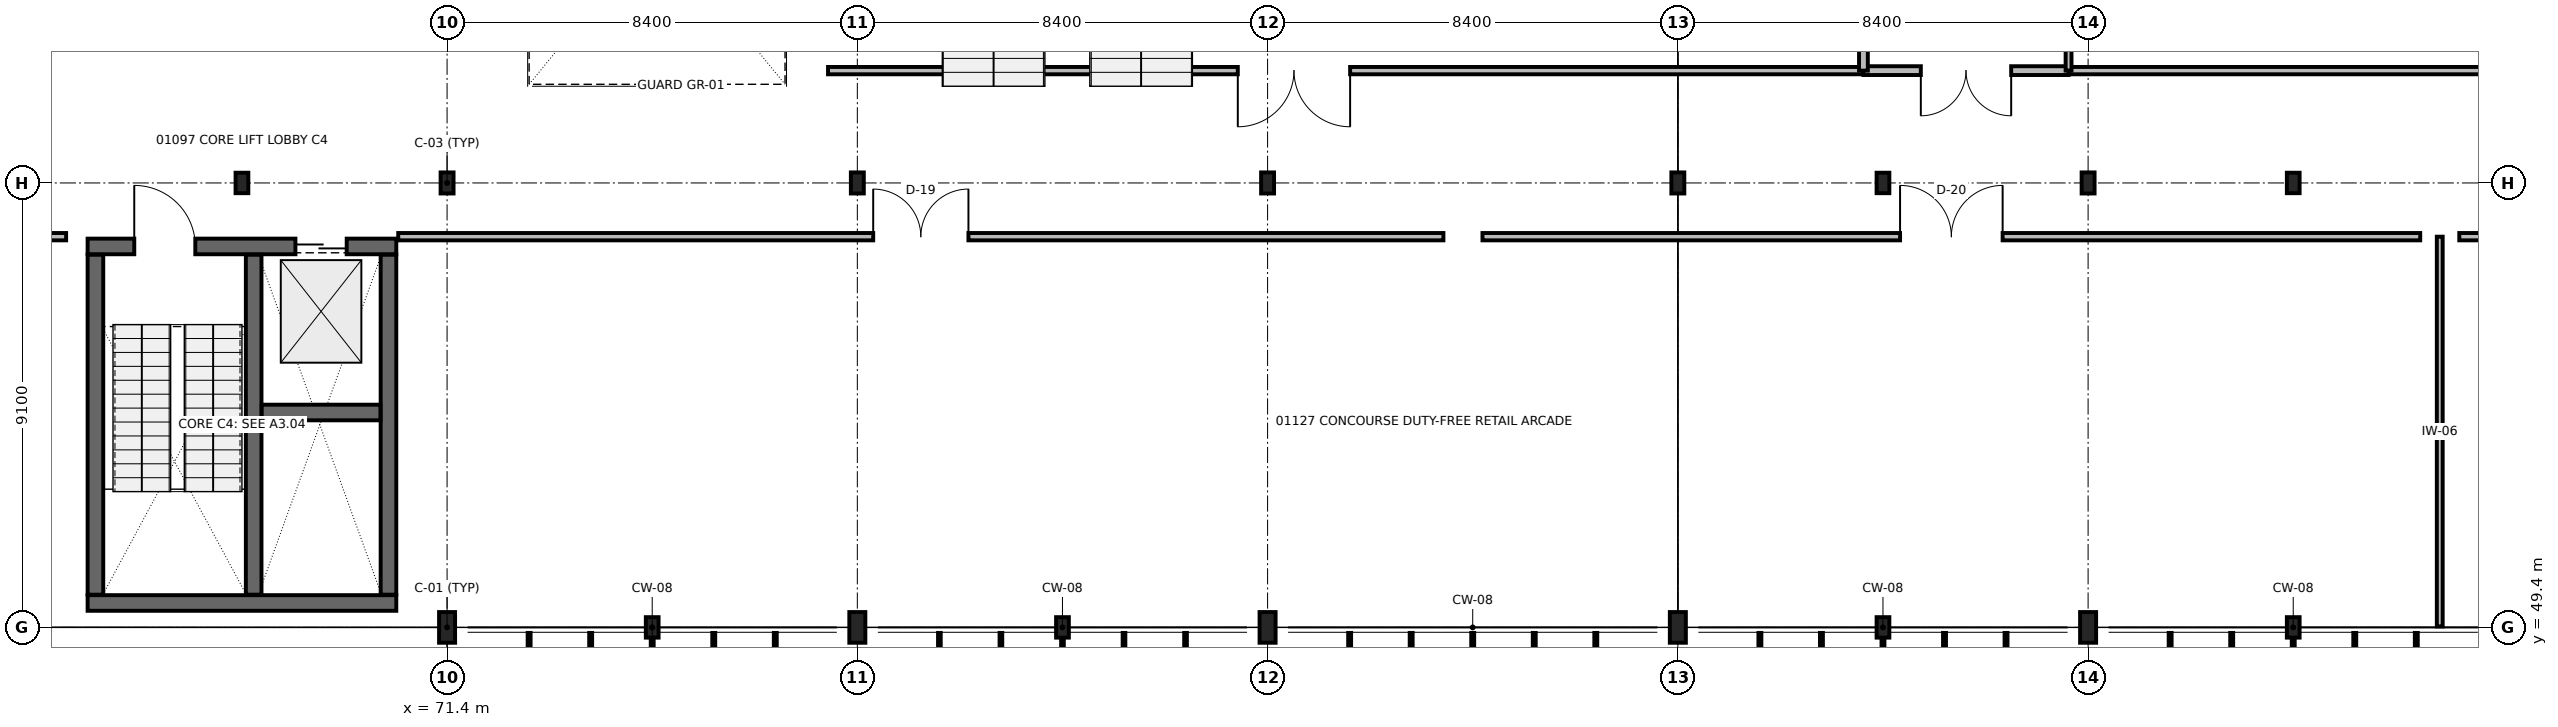
"""IFC4 building model, lengths in metres.
Left out: names, types, materials, properties, quantities, classifications, styles, units other than length and angle.
Written with IfcOpenShell. Run it as: python <this file> out.ifc"""

import sys

from ifc_helpers import new_model, si_unit, direction, frame, frame_2d, origin, origin_2d, place, context, subcontext, project, spatial, rectangle, i_section, extrude, element, fill, save


model = new_model("IFC4")
c1 = context("Model", 3, precision=1e-05, world=origin(), true_north=direction((0.0, 1.0)))
c2 = subcontext(c1, "Body", "Model", "MODEL_VIEW")
j1 = project(units=[si_unit("LENGTHUNIT", "METRE"), si_unit("PLANEANGLEUNIT", "RADIAN")], contexts=[c1])
p1 = place(None, origin())
s1 = spatial("IfcSite", under=j1, at=p1, CompositionType="ELEMENT")
p2 = place(p1, origin())
s2 = spatial("IfcBuilding", under=s1, at=p2, CompositionType="ELEMENT")
p3 = place(p2, frame((0.0, 0.0, 5.1)))
s3 = spatial("IfcBuildingStorey", under=s2, at=p3, CompositionType="ELEMENT", Elevation=5.1)
p4 = place(p3, frame((71.4, 49.4, 0.0), z_axis=(0.0, 0.0, 1.0), x_axis=(1.0, 0.0, 0.0)))
e1 = element("IfcColumn", 1, at=p4, inside=s3, PredefinedType="COLUMN", context=c2, shape_type="SweptSolid", body=[
    extrude(i_section(OverallWidth=0.328, OverallDepth=0.628, WebThickness=0.017, FlangeThickness=0.028, at=origin_2d()), origin(), (0.0, 0.0, 1.0), 4.5),
])
p5 = place(p3, frame((71.4, 58.5, 0.0), z_axis=(0.0, 0.0, 1.0), x_axis=(1.0, 0.0, 0.0)))
e2 = element("IfcColumn", 2, at=p5, inside=s3, PredefinedType="COLUMN", context=c2, shape_type="SweptSolid", body=[
    extrude(i_section(OverallWidth=0.265, OverallDepth=0.431, WebThickness=0.015, FlangeThickness=0.025, at=origin_2d()), origin(), (0.0, 0.0, 1.0), 4.5),
])
p6 = place(p3, frame((79.8, 49.4, 0.0), z_axis=(0.0, 0.0, 1.0), x_axis=(1.0, 0.0, 0.0)))
e3 = element("IfcColumn", 3, at=p6, inside=s3, PredefinedType="COLUMN", context=c2, shape_type="SweptSolid", body=[
    extrude(i_section(OverallWidth=0.328, OverallDepth=0.628, WebThickness=0.017, FlangeThickness=0.028, at=origin_2d()), origin(), (0.0, 0.0, 1.0), 4.5),
])
p7 = place(p3, frame((79.8, 58.5, 0.0), z_axis=(0.0, 0.0, 1.0), x_axis=(1.0, 0.0, 0.0)))
e4 = element("IfcColumn", 4, at=p7, inside=s3, PredefinedType="COLUMN", context=c2, shape_type="SweptSolid", body=[
    extrude(i_section(OverallWidth=0.265, OverallDepth=0.431, WebThickness=0.015, FlangeThickness=0.025, at=origin_2d()), origin(), (0.0, 0.0, 1.0), 4.5),
])
p8 = place(p3, frame((88.2, 49.4, 0.0), z_axis=(0.0, 0.0, 1.0), x_axis=(1.0, 0.0, 0.0)))
e5 = element("IfcColumn", 5, at=p8, inside=s3, PredefinedType="COLUMN", context=c2, shape_type="SweptSolid", body=[
    extrude(i_section(OverallWidth=0.328, OverallDepth=0.628, WebThickness=0.017, FlangeThickness=0.028, at=origin_2d()), origin(), (0.0, 0.0, 1.0), 4.5),
])
p9 = place(p3, frame((88.2, 58.5, 0.0), z_axis=(0.0, 0.0, 1.0), x_axis=(1.0, 0.0, 0.0)))
e6 = element("IfcColumn", 6, at=p9, inside=s3, PredefinedType="COLUMN", context=c2, shape_type="SweptSolid", body=[
    extrude(i_section(OverallWidth=0.265, OverallDepth=0.431, WebThickness=0.015, FlangeThickness=0.025, at=origin_2d()), origin(), (0.0, 0.0, 1.0), 4.5),
])
p10 = place(p3, frame((96.6, 49.4, 0.0), z_axis=(0.0, 0.0, 1.0), x_axis=(1.0, 0.0, 0.0)))
e7 = element("IfcColumn", 7, at=p10, inside=s3, PredefinedType="COLUMN", context=c2, shape_type="SweptSolid", body=[
    extrude(i_section(OverallWidth=0.328, OverallDepth=0.628, WebThickness=0.017, FlangeThickness=0.028, at=origin_2d()), origin(), (0.0, 0.0, 1.0), 4.5),
])
p11 = place(p3, frame((96.6, 58.5, 0.0), z_axis=(0.0, 0.0, 1.0), x_axis=(1.0, 0.0, 0.0)))
e8 = element("IfcColumn", 8, at=p11, inside=s3, PredefinedType="COLUMN", context=c2, shape_type="SweptSolid", body=[
    extrude(i_section(OverallWidth=0.265, OverallDepth=0.431, WebThickness=0.015, FlangeThickness=0.025, at=origin_2d()), origin(), (0.0, 0.0, 1.0), 4.5),
])
p12 = place(p3, frame((105.0, 49.4, 0.0), z_axis=(0.0, 0.0, 1.0), x_axis=(1.0, 0.0, 0.0)))
e9 = element("IfcColumn", 9, at=p12, inside=s3, PredefinedType="COLUMN", context=c2, shape_type="SweptSolid", body=[
    extrude(i_section(OverallWidth=0.328, OverallDepth=0.628, WebThickness=0.017, FlangeThickness=0.028, at=origin_2d()), origin(), (0.0, 0.0, 1.0), 4.5),
])
p13 = place(p3, frame((105.0, 58.5, 0.0), z_axis=(0.0, 0.0, 1.0), x_axis=(1.0, 0.0, 0.0)))
e10 = element("IfcColumn", 10, at=p13, inside=s3, PredefinedType="COLUMN", context=c2, shape_type="SweptSolid", body=[
    extrude(i_section(OverallWidth=0.265, OverallDepth=0.431, WebThickness=0.015, FlangeThickness=0.025, at=origin_2d()), origin(), (0.0, 0.0, 1.0), 4.5),
])
for number, where, z_axis, x_axis in (
    (11, (67.2, 58.5, 0.0), (0.0, 0.0, 1.0), (1.0, 0.0, 0.0)),
    (12, (75.6, 49.4, 0.0), (0.0, 0.0, 1.0), (1.0, 0.0, 0.0)),
    (13, (84.0, 49.4, 0.0), (0.0, 0.0, 1.0), (1.0, 0.0, 0.0)),
    (14, (100.8, 49.4, 0.0), (0.0, 0.0, 1.0), (1.0, 0.0, 0.0)),
    (15, (100.8, 58.5, 0.0), (0.0, 0.0, 1.0), (1.0, 0.0, 0.0)),
    (16, (109.2, 49.4, 0.0), (0.0, 0.0, 1.0), (1.0, 0.0, 0.0)),
    (17, (109.2, 58.5, 0.0), (0.0, 0.0, 1.0), (1.0, 0.0, 0.0)),
):
    element("IfcColumn", number, at=place(p3, frame(where, z_axis=z_axis, x_axis=x_axis)), inside=s3, PredefinedType="COLUMN", context=c2, shape_type="SweptSolid", body=[
        extrude(i_section(OverallWidth=0.261, OverallDepth=0.419, WebThickness=0.012, FlangeThickness=0.019, at=origin_2d()), origin(), (0.0, 0.0, 1.0), 4.5),
    ])
p14 = place(p3, frame((64.04, 49.9, 0.0), z_axis=(0.0, 0.0, 1.0), x_axis=(1.0, 0.0, 0.0)))
e18 = element("IfcWall", 18, at=p14, inside=s3, PredefinedType="SHEAR", context=c2, shape_type="SweptSolid", body=[
    extrude(rectangle(XDim=6.32, YDim=0.32, at=frame_2d((3.16, 0.0))), origin(), (0.0, 0.0, 1.0), 4.22),
])
p15 = place(p3, frame((64.04, 57.2, 0.0), z_axis=(0.0, 0.0, 1.0), x_axis=(1.0, 0.0, 0.0)))
e19 = element("IfcWall", 19, at=p15, inside=s3, PredefinedType="SHEAR", context=c2, shape_type="SweptSolid", body=[
    extrude(rectangle(XDim=6.32, YDim=0.32, at=frame_2d((3.16, 0.0))), origin(), (0.0, 0.0, 1.0), 4.22),
])
p16 = place(p15, frame((0.955, 0.0, 0.0)))
e20 = element("IfcOpeningElement", 20, at=p16, cuts=e19, PredefinedType="OPENING", context=c2, shape_type="SweptSolid", body=[
    extrude(rectangle(XDim=1.25, YDim=2.2, at=frame_2d((0.625, 1.1))), frame((0.0, 0.17, 0.0), z_axis=(0.0, -1.0, 0.0), x_axis=(1.0, 0.0, 0.0)), (0.0, 0.0, 1.0), 0.34),
])
p17 = place(p15, frame((4.255, 0.0, 0.0)))
e21 = element("IfcOpeningElement", 21, at=p17, cuts=e19, PredefinedType="OPENING", context=c2, shape_type="SweptSolid", body=[
    extrude(rectangle(XDim=1.05, YDim=2.15, at=frame_2d((0.525, 1.075))), frame((0.0, 0.17, 0.0), z_axis=(0.0, -1.0, 0.0), x_axis=(1.0, 0.0, 0.0)), (0.0, 0.0, 1.0), 0.34),
])
for number, where, z_axis, x_axis in (
    (22, (64.2, 50.07, 0.0), (0.0, 0.0, 1.0), (0.0, 1.0, 0.0)),
    (23, (70.2, 50.07, 0.0), (0.0, 0.0, 1.0), (0.0, 1.0, 0.0)),
    (24, (67.44, 50.07, 0.0), (0.0, 0.0, 1.0), (0.0, 1.0, 0.0)),
):
    element("IfcWall", number, at=place(p3, frame(where, z_axis=z_axis, x_axis=x_axis)), inside=s3, PredefinedType="SHEAR", context=c2, shape_type="SweptSolid", body=[
        extrude(rectangle(XDim=6.96, YDim=0.32, at=frame_2d((3.48, 0.0))), origin(), (0.0, 0.0, 1.0), 4.22),
    ])
p18 = place(p3, frame((67.605, 53.8, 0.0), z_axis=(0.0, 0.0, 1.0), x_axis=(1.0, 0.0, 0.0)))
e25 = element("IfcWall", 25, at=p18, inside=s3, PredefinedType="SHEAR", context=c2, shape_type="SweptSolid", body=[
    extrude(rectangle(XDim=2.43, YDim=0.32, at=frame_2d((1.215, 0.0))), origin(), (0.0, 0.0, 1.0), 4.22),
])
p19 = place(p3, frame((55.6, 57.4, 0.0), z_axis=(0.0, 0.0, 1.0), x_axis=(1.0, 0.0, 0.0)))
e26 = element("IfcWall", 26, at=p19, inside=s3, PredefinedType="PARTITIONING", context=c2, shape_type="SweptSolid", body=[
    extrude(rectangle(XDim=8.0, YDim=0.15, at=frame_2d((4.0, 0.0))), origin(), (0.0, 0.0, 1.0), 3.522),
])
p20 = place(p19, frame((2.85, 0.0, 0.0)))
e27 = element("IfcOpeningElement", 27, at=p20, cuts=e26, PredefinedType="OPENING", context=c2, shape_type="SweptSolid", body=[
    extrude(rectangle(XDim=2.3, YDim=2.45, at=frame_2d((1.15, 1.225))), frame((0.0, 0.085, 0.0), z_axis=(0.0, -1.0, 0.0), x_axis=(1.0, 0.0, 0.0)), (0.0, 0.0, 1.0), 0.17),
])
p21 = place(p3, frame((70.4, 57.4, 0.0), z_axis=(0.0, 0.0, 1.0), x_axis=(1.0, 0.0, 0.0)))
e28 = element("IfcWall", 28, at=p21, inside=s3, PredefinedType="PARTITIONING", context=c2, shape_type="SweptSolid", body=[
    extrude(rectangle(XDim=21.4, YDim=0.15, at=frame_2d((10.7, 0.0))), origin(), (0.0, 0.0, 1.0), 3.522),
])
p22 = place(p21, frame((9.725, 0.0, 0.0)))
e29 = element("IfcOpeningElement", 29, at=p22, cuts=e28, PredefinedType="OPENING", context=c2, shape_type="SweptSolid", body=[
    extrude(rectangle(XDim=1.95, YDim=2.35, at=frame_2d((0.975, 1.175))), frame((0.0, 0.085, 0.0), z_axis=(0.0, -1.0, 0.0), x_axis=(1.0, 0.0, 0.0)), (0.0, 0.0, 1.0), 0.17),
])
p23 = place(p3, frame((92.6, 57.4, 0.0), z_axis=(0.0, 0.0, 1.0), x_axis=(1.0, 0.0, 0.0)))
e30 = element("IfcWall", 30, at=p23, inside=s3, PredefinedType="PARTITIONING", context=c2, shape_type="SweptSolid", body=[
    extrude(rectangle(XDim=19.2, YDim=0.15, at=frame_2d((9.6, 0.0))), origin(), (0.0, 0.0, 1.0), 3.522),
])
p24 = place(p23, frame((8.55, 0.0, 0.0)))
e31 = element("IfcOpeningElement", 31, at=p24, cuts=e30, PredefinedType="OPENING", context=c2, shape_type="SweptSolid", body=[
    extrude(rectangle(XDim=2.1, YDim=2.4, at=frame_2d((1.05, 1.2))), frame((0.0, 0.085, 0.0), z_axis=(0.0, -1.0, 0.0), x_axis=(1.0, 0.0, 0.0)), (0.0, 0.0, 1.0), 0.17),
])
p25 = place(p3, frame((112.6, 57.4, 0.0), z_axis=(0.0, 0.0, 1.0), x_axis=(1.0, 0.0, 0.0)))
e32 = element("IfcWall", 32, at=p25, inside=s3, PredefinedType="PARTITIONING", context=c2, shape_type="SweptSolid", body=[
    extrude(rectangle(XDim=25.96, YDim=0.15, at=frame_2d((12.98, 0.0))), origin(), (0.0, 0.0, 1.0), 3.522),
])
p26 = place(p25, frame((6.394, 0.0, 0.0)))
e33 = element("IfcOpeningElement", 33, at=p26, cuts=e32, PredefinedType="OPENING", context=c2, shape_type="SweptSolid", body=[
    extrude(rectangle(XDim=1.75, YDim=2.35, at=frame_2d((0.875, 1.175))), frame((0.0, 0.085, 0.0), z_axis=(0.0, -1.0, 0.0), x_axis=(1.0, 0.0, 0.0)), (0.0, 0.0, 1.0), 0.17),
])
p27 = place(p3, frame((79.2, 60.8, 0.0), z_axis=(0.0, 0.0, 1.0), x_axis=(1.0, 0.0, 0.0)))
e34 = element("IfcWall", 34, at=p27, inside=s3, PredefinedType="PARTITIONING", context=c2, shape_type="SweptSolid", body=[
    extrude(rectangle(XDim=21.2, YDim=0.15, at=frame_2d((10.6, 0.0))), origin(), (0.0, 0.0, 1.0), 3.522),
])
p28 = place(p27, frame((8.39, 0.0, 0.0)))
e35 = element("IfcOpeningElement", 35, at=p28, cuts=e34, PredefinedType="OPENING", context=c2, shape_type="SweptSolid", body=[
    extrude(rectangle(XDim=2.3, YDim=2.45, at=frame_2d((1.15, 1.225))), frame((0.0, 0.085, 0.0), z_axis=(0.0, -1.0, 0.0), x_axis=(1.0, 0.0, 0.0)), (0.0, 0.0, 1.0), 0.17),
])
p29 = place(p3, frame((104.6, 60.8, 0.0), z_axis=(0.0, 0.0, 1.0), x_axis=(1.0, 0.0, 0.0)))
e36 = element("IfcWall", 36, at=p29, inside=s3, PredefinedType="PARTITIONING", context=c2, shape_type="SweptSolid", body=[
    extrude(rectangle(XDim=33.96, YDim=0.15, at=frame_2d((16.98, 0.0))), origin(), (0.0, 0.0, 1.0), 3.522),
])
p30 = place(p29, frame((14.132, 0.0, 0.0)))
e37 = element("IfcOpeningElement", 37, at=p30, cuts=e36, PredefinedType="OPENING", context=c2, shape_type="SweptSolid", body=[
    extrude(rectangle(XDim=2.3, YDim=2.45, at=frame_2d((1.15, 1.225))), frame((0.0, 0.085, 0.0), z_axis=(0.0, -1.0, 0.0), x_axis=(1.0, 0.0, 0.0)), (0.0, 0.0, 1.0), 0.17),
])
p31 = place(p3, frame((100.4, 60.8, 0.0), z_axis=(0.0, 0.0, 1.0), x_axis=(1.0, 0.0, 0.0)))
e38 = element("IfcWall", 38, at=p31, inside=s3, PredefinedType="PARTITIONING", context=c2, shape_type="SweptSolid", body=[
    extrude(rectangle(XDim=4.2, YDim=0.18, at=frame_2d((2.1, 0.0))), origin(), (0.0, 0.0, 1.0), 3.678),
])
p32 = place(p31, frame((1.175, 0.0, 0.0)))
e39 = element("IfcOpeningElement", 39, at=p32, cuts=e38, PredefinedType="OPENING", context=c2, shape_type="SweptSolid", body=[
    extrude(rectangle(XDim=1.85, YDim=2.3, at=frame_2d((0.925, 1.15))), frame((0.0, 0.1, 0.0), z_axis=(0.0, -1.0, 0.0), x_axis=(1.0, 0.0, 0.0)), (0.0, 0.0, 1.0), 0.2),
])
p33 = place(p3, frame((100.4, 60.8, 0.0), z_axis=(0.0, 0.0, 1.0), x_axis=(0.0, 1.0, 0.0)))
e40 = element("IfcWall", 40, at=p33, inside=s3, PredefinedType="PARTITIONING", context=c2, shape_type="SweptSolid", body=[
    extrude(rectangle(XDim=43.4, YDim=0.18, at=frame_2d((21.7, 0.0))), origin(), (0.0, 0.0, 1.0), 3.603),
])
p34 = place(p33, frame((12.095, 0.0, 0.0)))
e41 = element("IfcOpeningElement", 41, at=p34, cuts=e40, PredefinedType="OPENING", context=c2, shape_type="SweptSolid", body=[
    extrude(rectangle(XDim=1.85, YDim=2.3, at=frame_2d((0.925, 1.15))), frame((0.0, 0.1, 0.0), z_axis=(0.0, -1.0, 0.0), x_axis=(1.0, 0.0, 0.0)), (0.0, 0.0, 1.0), 0.2),
])
p35 = place(p33, frame((31.625, 0.0, 0.0)))
e42 = element("IfcOpeningElement", 42, at=p35, cuts=e40, PredefinedType="OPENING", context=c2, shape_type="SweptSolid", body=[
    extrude(rectangle(XDim=1.85, YDim=2.3, at=frame_2d((0.925, 1.15))), frame((0.0, 0.1, 0.0), z_axis=(0.0, -1.0, 0.0), x_axis=(1.0, 0.0, 0.0)), (0.0, 0.0, 1.0), 0.2),
])
p36 = place(p3, frame((104.6, 60.8, 0.0), z_axis=(0.0, 0.0, 1.0), x_axis=(0.0, 1.0, 0.0)))
e43 = element("IfcWall", 43, at=p36, inside=s3, PredefinedType="PARTITIONING", context=c2, shape_type="SweptSolid", body=[
    extrude(rectangle(XDim=42.58, YDim=0.12, at=frame_2d((21.29, 0.0))), origin(), (0.0, 0.0, 1.0), 3.364),
])
p37 = place(p36, frame((26.527, 0.0, 0.0)))
e44 = element("IfcOpeningElement", 44, at=p37, cuts=e43, PredefinedType="OPENING", context=c2, shape_type="SweptSolid", body=[
    extrude(rectangle(XDim=2.3, YDim=2.45, at=frame_2d((1.15, 1.225))), frame((0.0, 0.07, 0.0), z_axis=(0.0, -1.0, 0.0), x_axis=(1.0, 0.0, 0.0)), (0.0, 0.0, 1.0), 0.14),
])
p38 = place(p36, frame((30.785, 0.0, 0.0)))
e45 = element("IfcOpeningElement", 45, at=p38, cuts=e43, PredefinedType="OPENING", context=c2, shape_type="SweptSolid", body=[
    extrude(rectangle(XDim=2.3, YDim=2.45, at=frame_2d((1.15, 1.225))), frame((0.0, 0.07, 0.0), z_axis=(0.0, -1.0, 0.0), x_axis=(1.0, 0.0, 0.0)), (0.0, 0.0, 1.0), 0.14),
])
p39 = place(p3, frame((112.2, 49.42, 0.0), z_axis=(0.0, 0.0, 1.0), x_axis=(0.0, 1.0, 0.0)))
e46 = element("IfcWall", 46, at=p39, inside=s3, PredefinedType="PARTITIONING", context=c2, shape_type="SweptSolid", body=[
    extrude(rectangle(XDim=7.98, YDim=0.12, at=frame_2d((3.99, 0.0))), origin(), (0.0, 0.0, 1.0), 4.2),
])
p40 = place(p16, origin())
e47 = element("IfcDoor", 47, at=p40, inside=s3, OperationType="SINGLE_SWING_LEFT", PredefinedType="DOOR", context=c2, shape_type="SweptSolid", body=[
    extrude(rectangle(XDim=1.25, YDim=2.2, at=frame_2d((0.625, 1.1))), frame((0.0, 0.025, 0.0), z_axis=(0.0, -1.0, 0.0), x_axis=(1.0, 0.0, 0.0)), (0.0, 0.0, 1.0), 0.05),
])
fill(e20, e47)
p41 = place(p17, origin())
e48 = element("IfcDoor", 48, at=p41, inside=s3, OperationType="DOUBLE_DOOR_SLIDING", PredefinedType="DOOR", context=c2, shape_type="SweptSolid", body=[
    extrude(rectangle(XDim=1.05, YDim=2.15, at=frame_2d((0.525, 1.075))), frame((0.0, 0.025, 0.0), z_axis=(0.0, -1.0, 0.0), x_axis=(1.0, 0.0, 0.0)), (0.0, 0.0, 1.0), 0.05),
])
fill(e21, e48)
p42 = place(p22, origin())
e49 = element("IfcDoor", 49, at=p42, inside=s3, OperationType="DOUBLE_DOOR_SINGLE_SWING", PredefinedType="DOOR", context=c2, shape_type="SweptSolid", body=[
    extrude(rectangle(XDim=1.95, YDim=2.35, at=frame_2d((0.975, 1.175))), frame((0.0, 0.025, 0.0), z_axis=(0.0, -1.0, 0.0), x_axis=(1.0, 0.0, 0.0)), (0.0, 0.0, 1.0), 0.05),
])
fill(e29, e49)
p43 = place(p24, origin())
e50 = element("IfcDoor", 50, at=p43, inside=s3, OperationType="DOUBLE_DOOR_SINGLE_SWING", PredefinedType="DOOR", context=c2, shape_type="SweptSolid", body=[
    extrude(rectangle(XDim=2.1, YDim=2.4, at=frame_2d((1.05, 1.2))), frame((0.0, 0.025, 0.0), z_axis=(0.0, -1.0, 0.0), x_axis=(1.0, 0.0, 0.0)), (0.0, 0.0, 1.0), 0.05),
])
fill(e31, e50)
p44 = place(p28, frame((2.3, 0.0, 0.0), z_axis=(0.0, 0.0, 1.0), x_axis=(-1.0, 0.0, 0.0)))
e51 = element("IfcDoor", 51, at=p44, inside=s3, OperationType="DOUBLE_DOOR_SINGLE_SWING", PredefinedType="DOOR", context=c2, shape_type="SweptSolid", body=[
    extrude(rectangle(XDim=2.3, YDim=2.45, at=frame_2d((1.15, 1.225))), frame((0.0, 0.025, 0.0), z_axis=(0.0, -1.0, 0.0), x_axis=(1.0, 0.0, 0.0)), (0.0, 0.0, 1.0), 0.05),
])
fill(e35, e51)
p45 = place(p32, frame((1.85, 0.0, 0.0), z_axis=(0.0, 0.0, 1.0), x_axis=(-1.0, 0.0, 0.0)))
e52 = element("IfcDoor", 52, at=p45, inside=s3, OperationType="DOUBLE_DOOR_SINGLE_SWING", PredefinedType="DOOR", context=c2, shape_type="SweptSolid", body=[
    extrude(rectangle(XDim=1.85, YDim=2.3, at=frame_2d((0.925, 1.15))), frame((0.0, 0.025, 0.0), z_axis=(0.0, -1.0, 0.0), x_axis=(1.0, 0.0, 0.0)), (0.0, 0.0, 1.0), 0.05),
])
fill(e39, e52)
save(model, sys.argv[1])
